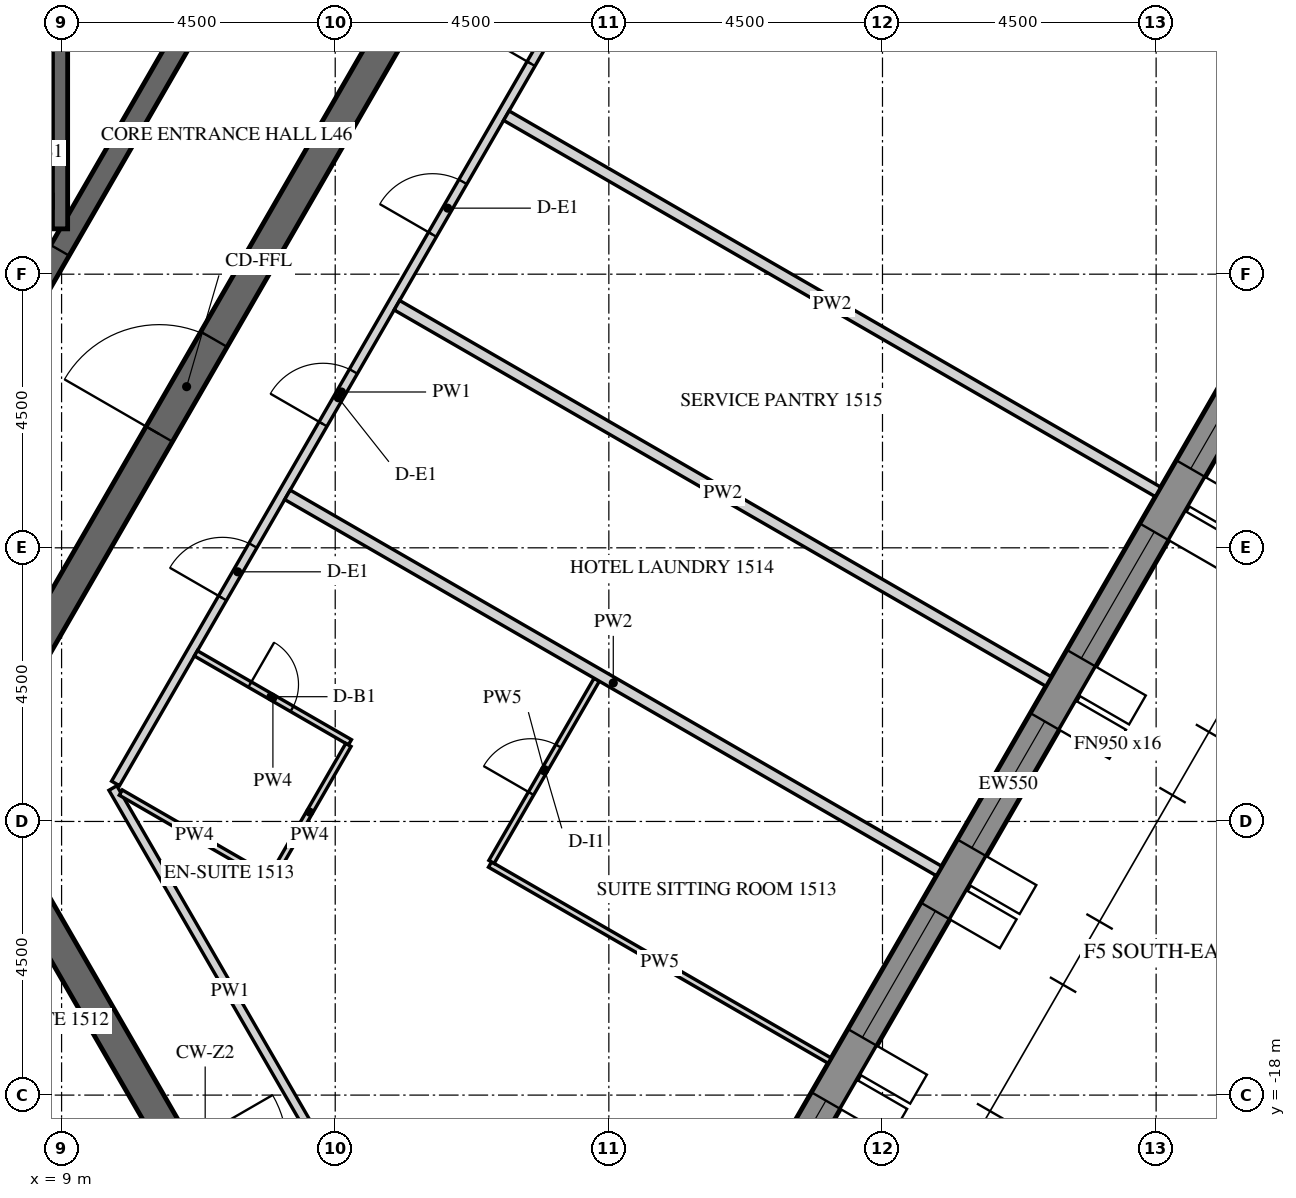
"""IFC4 building model, lengths in metres.
Left out: names, types, materials, properties, quantities, classifications, styles, units other than length and angle.
Written with IfcOpenShell. Run it as: python <this file> out.ifc"""

import sys

from ifc_helpers import new_model, si_unit, direction, frame, frame_2d, origin, place, context, subcontext, project, spatial, polyline, rectangle, outline, extrude, element, fill, save


model = new_model("IFC4")
c1 = context("Model", 3, precision=1e-05, world=origin(), true_north=direction((0.0, 1.0)))
c2 = subcontext(c1, "Body", "Model", "MODEL_VIEW")
j1 = project(units=[si_unit("LENGTHUNIT", "METRE"), si_unit("PLANEANGLEUNIT", "RADIAN")], contexts=[c1])
p1 = place(None, origin())
s1 = spatial("IfcSite", under=j1, at=p1, CompositionType="ELEMENT")
p2 = place(p1, origin())
s2 = spatial("IfcBuilding", under=s1, at=p2, CompositionType="ELEMENT")
p3 = place(p2, frame((0.0, 0.0, 195.6)))
s3 = spatial("IfcBuildingStorey", under=s2, at=p3, CompositionType="ELEMENT", Elevation=195.6)
p4 = place(p3, frame((17.63, -24.914, -0.15), z_axis=(0.0, 0.0, 1.0), x_axis=(0.499998569178, 0.866026229868, 0.0)))
e1 = element("IfcWall", 1, at=p4, inside=s3, PredefinedType="SOLIDWALL", context=c2, shape_type="SweptSolid", body=[
    extrude(outline(polyline([(-0.022, -0.275), (27.783, -0.275), (27.732, 0.275), (0.022, 0.275), (-0.022, -0.275)])), origin(), (0.0, 0.0, 1.0), 3.9),
])
p5 = place(p4, frame((1.879, 0.0, 1.05)))
e2 = element("IfcOpeningElement", 2, at=p5, cuts=e1, PredefinedType="OPENING", context=c2, shape_type="SweptSolid", body=[
    extrude(rectangle(XDim=2.4, YDim=2.4, at=frame_2d((1.2, 1.2))), frame((0.0, 0.285, 0.0), z_axis=(0.0, -1.0, 0.0), x_axis=(1.0, 0.0, 0.0)), (0.0, 0.0, 1.0), 0.57),
])
p6 = place(p4, frame((5.479, 0.0, 1.05)))
e3 = element("IfcOpeningElement", 3, at=p6, cuts=e1, PredefinedType="OPENING", context=c2, shape_type="SweptSolid", body=[
    extrude(rectangle(XDim=2.4, YDim=2.4, at=frame_2d((1.2, 1.2))), frame((0.0, 0.285, 0.0), z_axis=(0.0, -1.0, 0.0), x_axis=(1.0, 0.0, 0.0)), (0.0, 0.0, 1.0), 0.57),
])
p7 = place(p4, frame((9.079, 0.0, 1.05)))
e4 = element("IfcOpeningElement", 4, at=p7, cuts=e1, PredefinedType="OPENING", context=c2, shape_type="SweptSolid", body=[
    extrude(rectangle(XDim=2.4, YDim=2.4, at=frame_2d((1.2, 1.2))), frame((0.0, 0.285, 0.0), z_axis=(0.0, -1.0, 0.0), x_axis=(1.0, 0.0, 0.0)), (0.0, 0.0, 1.0), 0.57),
])
p8 = place(p4, frame((12.679, 0.0, 1.05)))
e5 = element("IfcOpeningElement", 5, at=p8, cuts=e1, PredefinedType="OPENING", context=c2, shape_type="SweptSolid", body=[
    extrude(rectangle(XDim=2.4, YDim=2.4, at=frame_2d((1.2, 1.2))), frame((0.0, 0.285, 0.0), z_axis=(0.0, -1.0, 0.0), x_axis=(1.0, 0.0, 0.0)), (0.0, 0.0, 1.0), 0.57),
])
p9 = place(p4, frame((16.279, 0.0, 1.05)))
e6 = element("IfcOpeningElement", 6, at=p9, cuts=e1, PredefinedType="OPENING", context=c2, shape_type="SweptSolid", body=[
    extrude(rectangle(XDim=2.4, YDim=2.4, at=frame_2d((1.2, 1.2))), frame((0.0, 0.285, 0.0), z_axis=(0.0, -1.0, 0.0), x_axis=(1.0, 0.0, 0.0)), (0.0, 0.0, 1.0), 0.57),
])
p10 = place(p4, frame((19.879, 0.0, 1.05)))
e7 = element("IfcOpeningElement", 7, at=p10, cuts=e1, PredefinedType="OPENING", context=c2, shape_type="SweptSolid", body=[
    extrude(rectangle(XDim=2.4, YDim=2.4, at=frame_2d((1.2, 1.2))), frame((0.0, 0.285, 0.0), z_axis=(0.0, -1.0, 0.0), x_axis=(1.0, 0.0, 0.0)), (0.0, 0.0, 1.0), 0.57),
])
p11 = place(p4, frame((23.479, 0.0, 1.05)))
e8 = element("IfcOpeningElement", 8, at=p11, cuts=e1, PredefinedType="OPENING", context=c2, shape_type="SweptSolid", body=[
    extrude(rectangle(XDim=2.4, YDim=2.4, at=frame_2d((1.2, 1.2))), frame((0.0, 0.285, 0.0), z_axis=(0.0, -1.0, 0.0), x_axis=(1.0, 0.0, 0.0)), (0.0, 0.0, 1.0), 0.57),
])
p12 = place(p3, frame((7.361, -12.75, -0.15), z_axis=(0.0, 0.0, 1.0), x_axis=(0.50000571537, 0.866022103989, 0.0)))
e9 = element("IfcWall", 9, at=p12, inside=s3, PredefinedType="SHEAR", context=c2, shape_type="SweptSolid", body=[
    extrude(outline(polyline([(-0.144, -0.25), (14.867, -0.25), (14.578, 0.25), (0.144, 0.25), (-0.144, -0.25)])), origin(), (0.0, 0.0, 1.0), 3.9),
])
p13 = place(p12, frame((6.49, 0.0, 0.15)))
e10 = element("IfcOpeningElement", 10, at=p13, cuts=e9, PredefinedType="OPENING", context=c2, shape_type="SweptSolid", body=[
    extrude(rectangle(XDim=1.8, YDim=2.4, at=frame_2d((0.9, 1.2))), frame((0.0, 0.26, 0.0), z_axis=(0.0, -1.0, 0.0), x_axis=(1.0, 0.0, 0.0)), (0.0, 0.0, 1.0), 0.52),
])
p14 = place(p3, frame((7.506, -13.0, -0.15), z_axis=(0.0, 0.0, 1.0), x_axis=(0.499988271576, -0.866032175087, 0.0)))
e11 = element("IfcWall", 11, at=p14, inside=s3, PredefinedType="SHEAR", context=c2, shape_type="SweptSolid", body=[
    extrude(rectangle(XDim=15.424, YDim=0.5, at=frame_2d((7.712, 0.0))), origin(), (0.0, 0.0, 1.0), 3.9),
])
p15 = place(p14, frame((6.812, 0.0, 0.15)))
e12 = element("IfcOpeningElement", 12, at=p15, cuts=e11, PredefinedType="OPENING", context=c2, shape_type="SweptSolid", body=[
    extrude(rectangle(XDim=1.8, YDim=2.4, at=frame_2d((0.9, 1.2))), frame((0.0, 0.26, 0.0), z_axis=(0.0, -1.0, 0.0), x_axis=(1.0, 0.0, 0.0)), (0.0, 0.0, 1.0), 0.52),
])
p16 = place(p3, frame((5.673, -9.825, -0.15), z_axis=(0.0, 0.0, 1.0), x_axis=(0.499995046907, 0.866028263435, 0.0)))
e13 = element("IfcWall", 13, at=p16, inside=s3, PredefinedType="SHEAR", context=c2, shape_type="SweptSolid", body=[
    extrude(outline(polyline([(-0.101, -0.175), (11.446, -0.175), (11.244, 0.175), (0.101, 0.175), (-0.101, -0.175)])), origin(), (0.0, 0.0, 1.0), 3.9),
])
p17 = place(p16, frame((4.801, 0.0, 0.15)))
e14 = element("IfcOpeningElement", 14, at=p17, cuts=e13, PredefinedType="OPENING", context=c2, shape_type="SweptSolid", body=[
    extrude(rectangle(XDim=1.8, YDim=2.4, at=frame_2d((0.9, 1.2))), frame((0.0, 0.185, 0.0), z_axis=(0.0, -1.0, 0.0), x_axis=(1.0, 0.0, 0.0)), (0.0, 0.0, 1.0), 0.37),
])
p18 = place(p3, frame((8.975, -3.755, -0.25), z_axis=(0.0, 0.0, 1.0), x_axis=(0.0, 1.0, 0.0)))
e15 = element("IfcWall", 15, at=p18, inside=s3, PredefinedType="SHEAR", context=c2, shape_type="SweptSolid", body=[
    extrude(rectangle(XDim=7.51, YDim=0.25, at=frame_2d((3.755, 0.0))), origin(), (0.0, 0.0, 1.0), 3.9),
])
p19 = place(p3, frame((5.9, -3.3, -0.25), z_axis=(0.0, 0.0, 1.0), x_axis=(1.0, 0.0, 0.0)))
e16 = element("IfcWall", 16, at=p19, inside=s3, PredefinedType="SHEAR", context=c2, shape_type="SweptSolid", body=[
    extrude(rectangle(XDim=2.95, YDim=0.2, at=frame_2d((1.475, 0.0))), origin(), (0.0, 0.0, 1.0), 3.9),
])
p20 = place(p19, frame((0.875, 0.0, 0.25)))
e17 = element("IfcOpeningElement", 17, at=p20, cuts=e16, PredefinedType="OPENING", context=c2, shape_type="SweptSolid", body=[
    extrude(rectangle(XDim=1.2, YDim=2.4, at=frame_2d((0.6, 1.2))), frame((0.0, 0.11, 0.0), z_axis=(0.0, -1.0, 0.0), x_axis=(1.0, 0.0, 0.0)), (0.0, 0.0, 1.0), 0.22),
])
p21 = place(p3, frame((6.506, -15.368, 0.0), z_axis=(0.0, 0.0, 1.0), x_axis=(0.499995202058, -0.86602817386, 0.0)))
e18 = element("IfcWall", 18, at=p21, inside=s3, PredefinedType="PARTITIONING", context=c2, shape_type="SweptSolid", body=[
    extrude(rectangle(XDim=7.361, YDim=0.15, at=frame_2d((3.68, 0.0))), origin(), (0.0, 0.0, 1.0), 2.988),
])
p22 = place(p21, frame((4.168, 0.0, 0.0)))
e19 = element("IfcOpeningElement", 19, at=p22, cuts=e18, PredefinedType="OPENING", context=c2, shape_type="SweptSolid", body=[
    extrude(rectangle(XDim=1.0, YDim=2.1, at=frame_2d((0.5, 1.05))), frame((0.0, 0.085, 0.0), z_axis=(0.0, -1.0, 0.0), x_axis=(1.0, 0.0, 0.0)), (0.0, 0.0, 1.0), 0.17),
])
p23 = place(p3, frame((13.699, -19.628, 0.0), z_axis=(0.0, 0.0, 1.0), x_axis=(-0.499993780622, 0.866028994514, 0.0)))
e20 = element("IfcWall", 20, at=p23, inside=s3, PredefinedType="PARTITIONING", context=c2, shape_type="SweptSolid", body=[
    extrude(rectangle(XDim=7.711, YDim=0.15, at=frame_2d((3.855, 0.0))), origin(), (0.0, 0.0, 1.0), 2.988),
])
p24 = place(p3, frame((9.887, -12.875, 0.0), z_axis=(0.0, 0.0, 1.0), x_axis=(0.499998228944, 0.866026426302, 0.0)))
e21 = element("IfcWall", 21, at=p24, inside=s3, PredefinedType="PARTITIONING", context=c2, shape_type="SweptSolid", body=[
    extrude(rectangle(XDim=14.867, YDim=0.15, at=frame_2d((7.433, 0.0))), origin(), (0.0, 0.0, 1.0), 2.988),
])
p25 = place(p24, frame((3.519, 0.0, 0.0)))
e22 = element("IfcOpeningElement", 22, at=p25, cuts=e21, PredefinedType="OPENING", context=c2, shape_type="SweptSolid", body=[
    extrude(rectangle(XDim=1.0, YDim=2.1, at=frame_2d((0.5, 1.05))), frame((0.0, 0.085, 0.0), z_axis=(0.0, -1.0, 0.0), x_axis=(1.0, 0.0, 0.0)), (0.0, 0.0, 1.0), 0.17),
])
p26 = place(p24, frame((6.824, 0.0, 0.0)))
e23 = element("IfcOpeningElement", 23, at=p26, cuts=e21, PredefinedType="OPENING", context=c2, shape_type="SweptSolid", body=[
    extrude(rectangle(XDim=1.0, YDim=2.1, at=frame_2d((0.5, 1.05))), frame((0.0, 0.085, 0.0), z_axis=(0.0, -1.0, 0.0), x_axis=(1.0, 0.0, 0.0)), (0.0, 0.0, 1.0), 0.17),
])
p27 = place(p24, frame((10.424, 0.0, 0.0)))
e24 = element("IfcOpeningElement", 24, at=p27, cuts=e21, PredefinedType="OPENING", context=c2, shape_type="SweptSolid", body=[
    extrude(rectangle(XDim=1.0, YDim=2.1, at=frame_2d((0.5, 1.05))), frame((0.0, 0.085, 0.0), z_axis=(0.0, -1.0, 0.0), x_axis=(1.0, 0.0, 0.0)), (0.0, 0.0, 1.0), 0.17),
])
p28 = place(p24, frame((13.667, 0.0, 0.0)))
e25 = element("IfcOpeningElement", 25, at=p28, cuts=e21, PredefinedType="OPENING", context=c2, shape_type="SweptSolid", body=[
    extrude(rectangle(XDim=1.0, YDim=2.1, at=frame_2d((0.5, 1.05))), frame((0.0, 0.085, 0.0), z_axis=(0.0, -1.0, 0.0), x_axis=(1.0, 0.0, 0.0)), (0.0, 0.0, 1.0), 0.17),
])
p29 = place(p3, frame((11.209, -10.736, 0.0), z_axis=(0.0, 0.0, 1.0), x_axis=(0.866046596414, -0.499963291492, 0.0)))
e26 = element("IfcWall", 26, at=p29, inside=s3, PredefinedType="PARTITIONING", context=c2, shape_type="SweptSolid", body=[
    extrude(rectangle(XDim=2.925, YDim=0.1, at=frame_2d((1.462, 0.0))), origin(), (0.0, 0.0, 1.0), 2.988),
])
p30 = place(p29, frame((1.025, 0.0, 0.0)))
e27 = element("IfcOpeningElement", 27, at=p30, cuts=e26, PredefinedType="OPENING", context=c2, shape_type="SweptSolid", body=[
    extrude(rectangle(XDim=0.8, YDim=2.1, at=frame_2d((0.4, 1.05))), frame((0.0, 0.06, 0.0), z_axis=(0.0, -1.0, 0.0), x_axis=(1.0, 0.0, 0.0)), (0.0, 0.0, 1.0), 0.12),
])
p31 = place(p3, frame((13.717, -12.242, 0.0), z_axis=(0.0, 0.0, 1.0), x_axis=(-0.499990435942, -0.866030925526, 0.0)))
e28 = element("IfcWall", 28, at=p31, inside=s3, PredefinedType="PARTITIONING", context=c2, shape_type="SweptSolid", body=[
    extrude(rectangle(XDim=2.55, YDim=0.1, at=frame_2d((1.275, 0.0))), origin(), (0.0, 0.0, 1.0), 2.988),
])
p32 = place(p3, frame((12.399, -14.425, 0.0), z_axis=(0.0, 0.0, 1.0), x_axis=(-0.866018616679, 0.500011755427, 0.0)))
e29 = element("IfcWall", 29, at=p32, inside=s3, PredefinedType="PARTITIONING", context=c2, shape_type="SweptSolid", body=[
    extrude(rectangle(XDim=2.8, YDim=0.1, at=frame_2d((1.4, 0.0))), origin(), (0.0, 0.0, 1.0), 2.988),
])
p33 = place(p3, frame((21.631, -17.433, 0.0), z_axis=(0.0, 0.0, 1.0), x_axis=(-0.86603809205, 0.499978022635, 0.0)))
e30 = element("IfcWall", 30, at=p33, inside=s3, PredefinedType="PARTITIONING", context=c2, shape_type="SweptSolid", body=[
    extrude(rectangle(XDim=6.45, YDim=0.1, at=frame_2d((3.225, 0.0))), origin(), (0.0, 0.0, 1.0), 2.988),
])
p34 = place(p3, frame((16.071, -14.165, 0.0), z_axis=(0.0, 0.0, 1.0), x_axis=(0.500009533716, 0.866019899421, 0.0)))
e31 = element("IfcWall", 31, at=p34, inside=s3, PredefinedType="PARTITIONING", context=c2, shape_type="SweptSolid", body=[
    extrude(rectangle(XDim=3.46, YDim=0.1, at=frame_2d((1.73, 0.0))), origin(), (0.0, 0.0, 1.0), 2.988),
])
p35 = place(p34, frame((1.3, 0.0, 0.0)))
e32 = element("IfcOpeningElement", 32, at=p35, cuts=e31, PredefinedType="OPENING", context=c2, shape_type="SweptSolid", body=[
    extrude(rectangle(XDim=0.9, YDim=2.1, at=frame_2d((0.45, 1.05))), frame((0.0, 0.06, 0.0), z_axis=(0.0, -1.0, 0.0), x_axis=(1.0, 0.0, 0.0)), (0.0, 0.0, 1.0), 0.12),
])
p36 = place(p3, frame((23.431, -14.316, 0.0), z_axis=(0.0, 0.0, 1.0), x_axis=(-0.866024931941, 0.500000817256, 0.0)))
e33 = element("IfcWall", 33, at=p36, inside=s3, PredefinedType="PARTITIONING", context=c2, shape_type="SweptSolid", body=[
    extrude(rectangle(XDim=12.375, YDim=0.18, at=frame_2d((6.188, 0.0))), origin(), (0.0, 0.0, 1.0), 2.988),
])
p37 = place(p3, frame((25.231, -11.198, 0.0), z_axis=(0.0, 0.0, 1.0), x_axis=(-0.866029863972, 0.499992274648, 0.0)))
e34 = element("IfcWall", 34, at=p37, inside=s3, PredefinedType="PARTITIONING", context=c2, shape_type="SweptSolid", body=[
    extrude(rectangle(XDim=12.375, YDim=0.18, at=frame_2d((6.188, 0.0))), origin(), (0.0, 0.0, 1.0), 2.988),
])
p38 = place(p3, frame((27.031, -8.08, 0.0), z_axis=(0.0, 0.0, 1.0), x_axis=(-0.866024931941, 0.500000817256, 0.0)))
e35 = element("IfcWall", 35, at=p38, inside=s3, PredefinedType="PARTITIONING", context=c2, shape_type="SweptSolid", body=[
    extrude(rectangle(XDim=12.375, YDim=0.18, at=frame_2d((6.188, 0.0))), origin(), (0.0, 0.0, 1.0), 2.988),
])
p39 = place(p6, frame((0.0, 0.205, 0.0)))
e36 = element("IfcWindow", 36, at=p39, inside=s3, PartitioningType="DOUBLE_PANEL_VERTICAL", PredefinedType="WINDOW", context=c2, shape_type="SweptSolid", body=[
    extrude(rectangle(XDim=2.4, YDim=2.4, at=frame_2d((1.2, 1.2))), frame((0.0, 0.03, 0.0), z_axis=(0.0, -1.0, 0.0), x_axis=(1.0, 0.0, 0.0)), (0.0, 0.0, 1.0), 0.06),
])
fill(e3, e36)
p40 = place(p7, frame((0.0, 0.205, 0.0)))
e37 = element("IfcWindow", 37, at=p40, inside=s3, PartitioningType="DOUBLE_PANEL_VERTICAL", PredefinedType="WINDOW", context=c2, shape_type="SweptSolid", body=[
    extrude(rectangle(XDim=2.4, YDim=2.4, at=frame_2d((1.2, 1.2))), frame((0.0, 0.03, 0.0), z_axis=(0.0, -1.0, 0.0), x_axis=(1.0, 0.0, 0.0)), (0.0, 0.0, 1.0), 0.06),
])
fill(e4, e37)
p41 = place(p8, frame((0.0, 0.205, 0.0)))
e38 = element("IfcWindow", 38, at=p41, inside=s3, PartitioningType="DOUBLE_PANEL_VERTICAL", PredefinedType="WINDOW", context=c2, shape_type="SweptSolid", body=[
    extrude(rectangle(XDim=2.4, YDim=2.4, at=frame_2d((1.2, 1.2))), frame((0.0, 0.03, 0.0), z_axis=(0.0, -1.0, 0.0), x_axis=(1.0, 0.0, 0.0)), (0.0, 0.0, 1.0), 0.06),
])
fill(e5, e38)
p42 = place(p9, frame((0.0, 0.205, 0.0)))
e39 = element("IfcWindow", 39, at=p42, inside=s3, PartitioningType="DOUBLE_PANEL_VERTICAL", PredefinedType="WINDOW", context=c2, shape_type="SweptSolid", body=[
    extrude(rectangle(XDim=2.4, YDim=2.4, at=frame_2d((1.2, 1.2))), frame((0.0, 0.03, 0.0), z_axis=(0.0, -1.0, 0.0), x_axis=(1.0, 0.0, 0.0)), (0.0, 0.0, 1.0), 0.06),
])
fill(e6, e39)
p43 = place(p10, frame((0.0, 0.205, 0.0)))
e40 = element("IfcWindow", 40, at=p43, inside=s3, PartitioningType="DOUBLE_PANEL_VERTICAL", PredefinedType="WINDOW", context=c2, shape_type="SweptSolid", body=[
    extrude(rectangle(XDim=2.4, YDim=2.4, at=frame_2d((1.2, 1.2))), frame((0.0, 0.03, 0.0), z_axis=(0.0, -1.0, 0.0), x_axis=(1.0, 0.0, 0.0)), (0.0, 0.0, 1.0), 0.06),
])
fill(e7, e40)
p44 = place(p13, origin())
e41 = element("IfcDoor", 41, at=p44, inside=s3, OperationType="DOUBLE_DOOR_SINGLE_SWING", PredefinedType="DOOR", context=c2, shape_type="SweptSolid", body=[
    extrude(rectangle(XDim=1.8, YDim=2.4, at=frame_2d((0.9, 1.2))), frame((0.0, 0.025, 0.0), z_axis=(0.0, -1.0, 0.0), x_axis=(1.0, 0.0, 0.0)), (0.0, 0.0, 1.0), 0.05),
])
fill(e10, e41)
p45 = place(p17, origin())
e42 = element("IfcDoor", 42, at=p45, inside=s3, OperationType="DOUBLE_DOOR_SINGLE_SWING", PredefinedType="DOOR", context=c2, shape_type="SweptSolid", body=[
    extrude(rectangle(XDim=1.8, YDim=2.4, at=frame_2d((0.9, 1.2))), frame((0.0, 0.025, 0.0), z_axis=(0.0, -1.0, 0.0), x_axis=(1.0, 0.0, 0.0)), (0.0, 0.0, 1.0), 0.05),
])
fill(e14, e42)
p46 = place(p25, origin())
e43 = element("IfcDoor", 43, at=p46, inside=s3, OperationType="SINGLE_SWING_RIGHT", PredefinedType="DOOR", context=c2, shape_type="SweptSolid", body=[
    extrude(rectangle(XDim=1.0, YDim=2.1, at=frame_2d((0.5, 1.05))), frame((0.0, 0.025, 0.0), z_axis=(0.0, -1.0, 0.0), x_axis=(1.0, 0.0, 0.0)), (0.0, 0.0, 1.0), 0.05),
])
fill(e22, e43)
p47 = place(p30, origin())
e44 = element("IfcDoor", 44, at=p47, inside=s3, OperationType="SINGLE_SWING_RIGHT", PredefinedType="DOOR", context=c2, shape_type="SweptSolid", body=[
    extrude(rectangle(XDim=0.8, YDim=2.1, at=frame_2d((0.4, 1.05))), frame((0.0, 0.025, 0.0), z_axis=(0.0, -1.0, 0.0), x_axis=(1.0, 0.0, 0.0)), (0.0, 0.0, 1.0), 0.05),
])
fill(e27, e44)
p48 = place(p35, origin())
e45 = element("IfcDoor", 45, at=p48, inside=s3, OperationType="SINGLE_SWING_LEFT", PredefinedType="DOOR", context=c2, shape_type="SweptSolid", body=[
    extrude(rectangle(XDim=0.9, YDim=2.1, at=frame_2d((0.45, 1.05))), frame((0.0, 0.025, 0.0), z_axis=(0.0, -1.0, 0.0), x_axis=(1.0, 0.0, 0.0)), (0.0, 0.0, 1.0), 0.05),
])
fill(e32, e45)
p49 = place(p26, origin())
e46 = element("IfcDoor", 46, at=p49, inside=s3, OperationType="SINGLE_SWING_RIGHT", PredefinedType="DOOR", context=c2, shape_type="SweptSolid", body=[
    extrude(rectangle(XDim=1.0, YDim=2.1, at=frame_2d((0.5, 1.05))), frame((0.0, 0.025, 0.0), z_axis=(0.0, -1.0, 0.0), x_axis=(1.0, 0.0, 0.0)), (0.0, 0.0, 1.0), 0.05),
])
fill(e23, e46)
p50 = place(p27, origin())
e47 = element("IfcDoor", 47, at=p50, inside=s3, OperationType="SINGLE_SWING_RIGHT", PredefinedType="DOOR", context=c2, shape_type="SweptSolid", body=[
    extrude(rectangle(XDim=1.0, YDim=2.1, at=frame_2d((0.5, 1.05))), frame((0.0, 0.025, 0.0), z_axis=(0.0, -1.0, 0.0), x_axis=(1.0, 0.0, 0.0)), (0.0, 0.0, 1.0), 0.05),
])
fill(e24, e47)
p51 = place(p28, origin())
e48 = element("IfcDoor", 48, at=p51, inside=s3, OperationType="SINGLE_SWING_LEFT", PredefinedType="DOOR", context=c2, shape_type="SweptSolid", body=[
    extrude(rectangle(XDim=1.0, YDim=2.1, at=frame_2d((0.5, 1.05))), frame((0.0, 0.025, 0.0), z_axis=(0.0, -1.0, 0.0), x_axis=(1.0, 0.0, 0.0)), (0.0, 0.0, 1.0), 0.05),
])
fill(e25, e48)
save(model, sys.argv[1])
